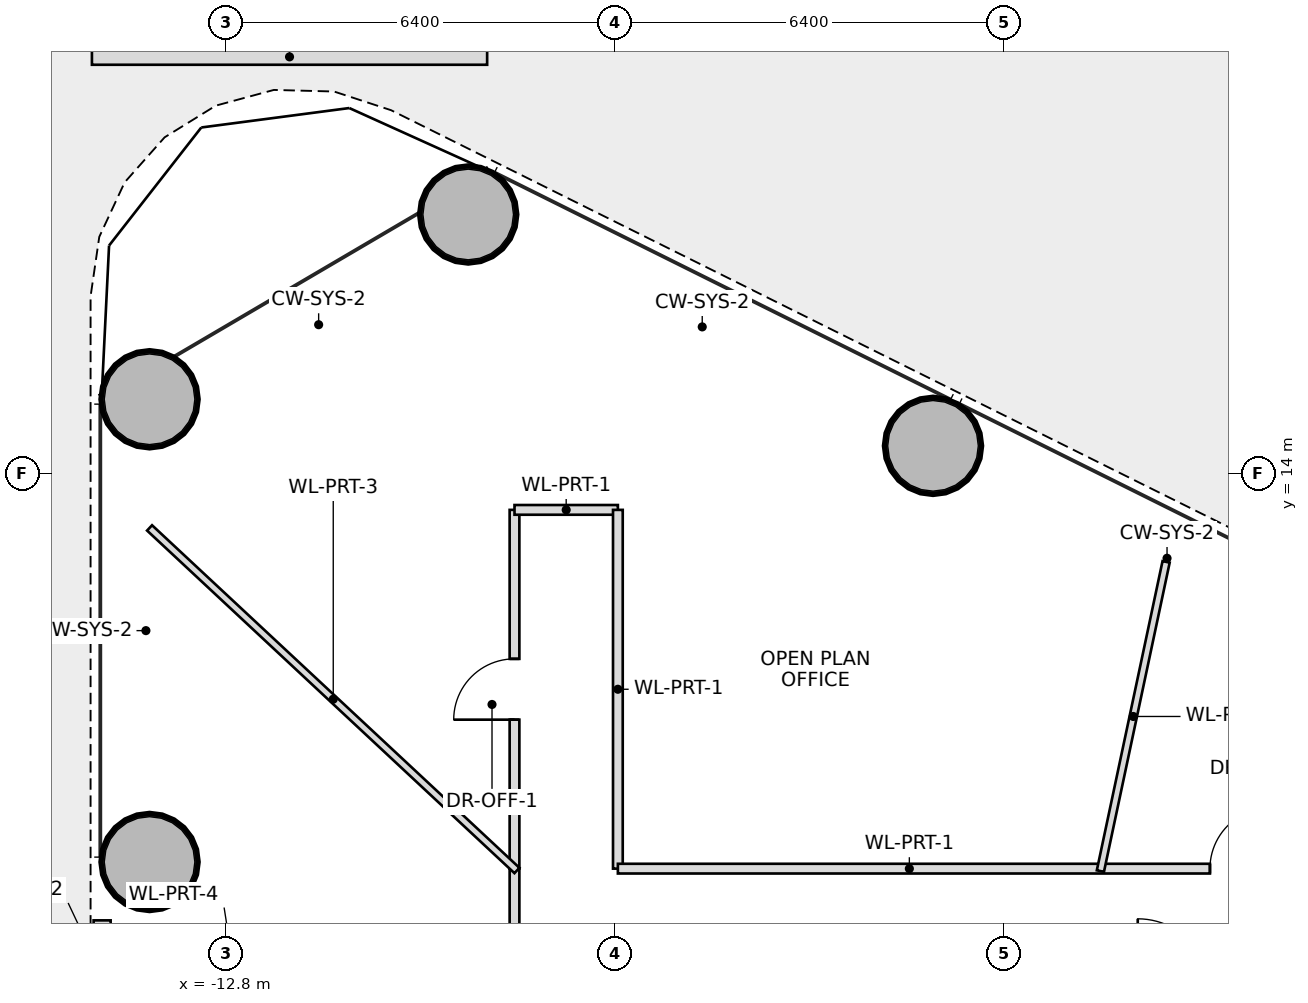
"""IFC4 building model, lengths in metres.
Left out: names, types, materials, properties, quantities, classifications, styles, units other than length and angle.
Written with IfcOpenShell. Run it as: python <this file> out.ifc"""

import sys

from ifc_helpers import new_model, si_unit, direction, frame, frame_2d, origin, origin_2d, place, context, subcontext, project, spatial, rectangle, hollow_circle, extrude, source, transform, mapped, element, fill, save


model = new_model("IFC4")
c1 = context("Model", 3, precision=1e-05, world=origin(), true_north=direction((0.0, 1.0)))
c2 = subcontext(c1, "Body", "Model", "MODEL_VIEW")
j1 = project(units=[si_unit("LENGTHUNIT", "METRE"), si_unit("PLANEANGLEUNIT", "RADIAN")], contexts=[c1])
p1 = place(None, origin())
s1 = spatial("IfcSite", under=j1, at=p1, CompositionType="ELEMENT")
p2 = place(p1, origin())
s2 = spatial("IfcBuilding", under=s1, at=p2, CompositionType="ELEMENT")
p3 = place(p2, frame((0.0, 0.0, 20.1)))
s3 = spatial("IfcBuildingStorey", under=s2, at=p3, CompositionType="ELEMENT", Elevation=20.1)
m1 = source(origin(), c2, "Body", "SweptSolid", [
    extrude(hollow_circle(Radius=0.8, WallThickness=0.055, at=origin_2d()), origin(), (0.0, 0.0, 1.0), 4.02),
])
for number, where, z_axis, x_axis in (
    (1, (-1.167, 14.453, -0.32), (0.0, 0.0, 1.0), (1.0, 0.0, 0.0)),
    (2, (-8.812, 18.258, -0.32), (0.0, 0.0, 1.0), (1.0, 0.0, 0.0)),
    (3, (-14.052, 15.219, -0.32), (0.0, 0.0, 1.0), (1.0, 0.0, 0.0)),
    (4, (-14.052, 7.61, -0.32), (0.0, 0.0, 1.0), (1.0, 0.0, 0.0)),
):
    element("IfcColumn", number, at=place(p3, frame(where, z_axis=z_axis, x_axis=x_axis)), inside=s3, PredefinedType="COLUMN", context=c2, shape_type="MappedRepresentation", body=[
        mapped(m1, transform((0.0, 0.0, 0.0), scale=1.0)),
    ])
p4 = place(p3, frame((-15.0, 20.85, 0.0), z_axis=(0.0, 0.0, 1.0), x_axis=(1.0, 0.0, 0.0)))
e5 = element("IfcWall", 5, at=p4, inside=s3, PredefinedType="PARAPET", context=c2, shape_type="SweptSolid", body=[
    extrude(rectangle(XDim=6.5, YDim=0.26, at=frame_2d((3.25, 0.0))), origin(), (0.0, 0.0, 1.0), 0.6),
])
p5 = place(p3, frame((-14.832, 0.96, 0.0), z_axis=(0.0, 0.0, 1.0), x_axis=(0.0, 1.0, 0.0)))
e6 = element("IfcWall", 6, at=p5, inside=s3, PredefinedType="SOLIDWALL", context=c2, shape_type="SweptSolid", body=[
    extrude(rectangle(XDim=5.689, YDim=0.28, at=frame_2d((2.845, 0.0))), origin(), (0.0, 0.0, 1.0), 2.915),
])
p6 = place(p5, frame((1.945, 0.0, 0.0)))
e7 = element("IfcOpeningElement", 7, at=p6, cuts=e6, PredefinedType="OPENING", context=c2, shape_type="SweptSolid", body=[
    extrude(rectangle(XDim=1.8, YDim=2.35, at=frame_2d((0.9, 1.175))), frame((0.0, 0.15, 0.0), z_axis=(0.0, -1.0, 0.0), x_axis=(1.0, 0.0, 0.0)), (0.0, 0.0, 1.0), 0.3),
])
p7 = place(p3, frame((-8.05, -7.5, 0.0), z_axis=(0.0, 0.0, 1.0), x_axis=(0.0, 1.0, 0.0)))
e8 = element("IfcWall", 8, at=p7, inside=s3, PredefinedType="PARTITIONING", context=c2, shape_type="SweptSolid", body=[
    extrude(rectangle(XDim=15.0, YDim=0.16, at=frame_2d((7.5, 0.0))), origin(), (0.0, 0.0, 1.0), 2.8),
])
p8 = place(p7, frame((7.0, 0.0, 0.0)))
e9 = element("IfcOpeningElement", 9, at=p8, cuts=e8, PredefinedType="OPENING", context=c2, shape_type="SweptSolid", body=[
    extrude(rectangle(XDim=1.0, YDim=2.25, at=frame_2d((0.5, 1.125))), frame((0.0, 0.09, 0.0), z_axis=(0.0, -1.0, 0.0), x_axis=(1.0, 0.0, 0.0)), (0.0, 0.0, 1.0), 0.18),
])
p9 = place(p3, frame((-8.05, 7.5, 0.0), z_axis=(0.0, 0.0, 1.0), x_axis=(0.0, 1.0, 0.0)))
e10 = element("IfcWall", 10, at=p9, inside=s3, PredefinedType="PARTITIONING", context=c2, shape_type="SweptSolid", body=[
    extrude(rectangle(XDim=5.9, YDim=0.16, at=frame_2d((2.95, 0.0))), origin(), (0.0, 0.0, 1.0), 2.8),
])
p10 = place(p9, frame((2.45, 0.0, 0.0)))
e11 = element("IfcOpeningElement", 11, at=p10, cuts=e10, PredefinedType="OPENING", context=c2, shape_type="SweptSolid", body=[
    extrude(rectangle(XDim=1.0, YDim=2.25, at=frame_2d((0.5, 1.125))), frame((0.0, 0.09, 0.0), z_axis=(0.0, -1.0, 0.0), x_axis=(1.0, 0.0, 0.0)), (0.0, 0.0, 1.0), 0.18),
])
p11 = place(p3, frame((-8.05, 13.4, 0.0), z_axis=(0.0, 0.0, 1.0), x_axis=(1.0, 0.0, 0.0)))
e12 = element("IfcWall", 12, at=p11, inside=s3, PredefinedType="PARTITIONING", context=c2, shape_type="SweptSolid", body=[
    extrude(rectangle(XDim=1.7, YDim=0.16, at=frame_2d((0.85, 0.0))), origin(), (0.0, 0.0, 1.0), 2.8),
])
p12 = place(p3, frame((-6.35, 13.4, 0.0), z_axis=(0.0, 0.0, 1.0), x_axis=(0.0, -1.0, 0.0)))
e13 = element("IfcWall", 13, at=p12, inside=s3, PredefinedType="PARTITIONING", context=c2, shape_type="SweptSolid", body=[
    extrude(rectangle(XDim=5.9, YDim=0.16, at=frame_2d((2.95, 0.0))), origin(), (0.0, 0.0, 1.0), 2.8),
])
p13 = place(p3, frame((-6.35, 7.5, 0.0), z_axis=(0.0, 0.0, 1.0), x_axis=(1.0, 0.0, 0.0)))
e14 = element("IfcWall", 14, at=p13, inside=s3, PredefinedType="PARTITIONING", context=c2, shape_type="SweptSolid", body=[
    extrude(rectangle(XDim=12.7, YDim=0.16, at=frame_2d((6.35, 0.0))), origin(), (0.0, 0.0, 1.0), 2.8),
])
p14 = place(p13, frame((9.737, 0.0, 0.0)))
e15 = element("IfcOpeningElement", 15, at=p14, cuts=e14, PredefinedType="OPENING", context=c2, shape_type="SweptSolid", body=[
    extrude(rectangle(XDim=1.0, YDim=2.25, at=frame_2d((0.5, 1.125))), frame((0.0, 0.09, 0.0), z_axis=(0.0, -1.0, 0.0), x_axis=(1.0, 0.0, 0.0)), (0.0, 0.0, 1.0), 0.18),
])
p15 = place(p3, frame((1.586, 7.46, 0.0), z_axis=(0.0, 0.0, 1.0), x_axis=(0.207905936394, 0.978148823857, 0.0)))
e16 = element("IfcWall", 16, at=p15, inside=s3, PredefinedType="PARTITIONING", context=c2, shape_type="SweptSolid", body=[
    extrude(rectangle(XDim=5.198, YDim=0.12, at=frame_2d((2.599, 0.0))), origin(), (0.0, 0.0, 1.0), 2.96),
])
p16 = place(p3, frame((-8.01, 7.469, 0.0), z_axis=(0.0, 0.0, 1.0), x_axis=(-0.731351982223, 0.682000203885, 0.0)))
e17 = element("IfcWall", 17, at=p16, inside=s3, PredefinedType="PARTITIONING", context=c2, shape_type="SweptSolid", body=[
    extrude(rectangle(XDim=8.261, YDim=0.12, at=frame_2d((4.131, 0.0))), origin(), (0.0, 0.0, 1.0), 2.96),
])
p17 = place(p10, origin())
e18 = element("IfcDoor", 18, at=p17, inside=s3, OperationType="SINGLE_SWING_LEFT", PredefinedType="DOOR", context=c2, shape_type="SweptSolid", body=[
    extrude(rectangle(XDim=1.0, YDim=2.25, at=frame_2d((0.5, 1.125))), frame((0.0, 0.025, 0.0), z_axis=(0.0, -1.0, 0.0), x_axis=(1.0, 0.0, 0.0)), (0.0, 0.0, 1.0), 0.05),
])
fill(e11, e18)
p18 = place(p14, origin())
e19 = element("IfcDoor", 19, at=p18, inside=s3, OperationType="SINGLE_SWING_RIGHT", PredefinedType="DOOR", context=c2, shape_type="SweptSolid", body=[
    extrude(rectangle(XDim=1.0, YDim=2.25, at=frame_2d((0.5, 1.125))), frame((0.0, 0.025, 0.0), z_axis=(0.0, -1.0, 0.0), x_axis=(1.0, 0.0, 0.0)), (0.0, 0.0, 1.0), 0.05),
])
fill(e15, e19)
save(model, sys.argv[1])
